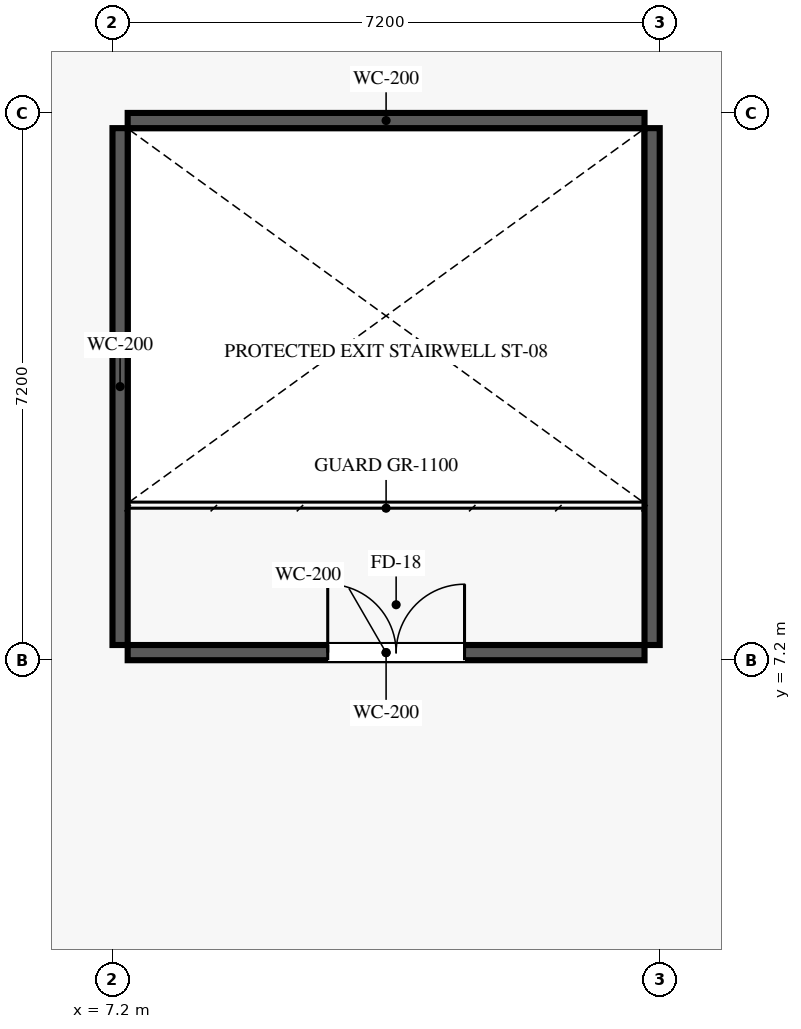
"""IFC4 building model, lengths in metres.
Left out: names, types, materials, properties, quantities, classifications, styles, units other than length and angle.
Written with IfcOpenShell. Run it as: python <this file> out.ifc"""

import sys

from ifc_helpers import new_model, si_unit, direction, frame, frame_2d, origin, place, context, subcontext, project, spatial, rectangle, extrude, element, fill, save


model = new_model("IFC4")
c1 = context("Model", 3, precision=1e-05, world=origin(), true_north=direction((0.0, 1.0)))
c2 = subcontext(c1, "Body", "Model", "MODEL_VIEW")
j1 = project(units=[si_unit("LENGTHUNIT", "METRE"), si_unit("PLANEANGLEUNIT", "RADIAN")], contexts=[c1])
p1 = place(None, origin())
s1 = spatial("IfcSite", under=j1, at=p1, CompositionType="ELEMENT")
p2 = place(p1, origin())
s2 = spatial("IfcBuilding", under=s1, at=p2, CompositionType="ELEMENT")
p3 = place(p2, frame((0.0, 0.0, 5.4)))
s3 = spatial("IfcBuildingStorey", under=s2, at=p3, CompositionType="ELEMENT", Elevation=5.4)
p4 = place(p3, frame((7.4, 7.3, 0.0), z_axis=(0.0, 0.0, 1.0), x_axis=(1.0, 0.0, 0.0)))
e1 = element("IfcWall", 1, at=p4, inside=s3, PredefinedType="SHEAR", context=c2, shape_type="SweptSolid", body=[
    extrude(rectangle(XDim=6.8, YDim=0.2, at=frame_2d((3.4, 0.0))), origin(), (0.0, 0.0, 1.0), 3.81),
])
p5 = place(p4, frame((2.632, 0.0, 0.0)))
e2 = element("IfcOpeningElement", 2, at=p5, cuts=e1, PredefinedType="OPENING", context=c2, shape_type="SweptSolid", body=[
    extrude(rectangle(XDim=1.8, YDim=2.2, at=frame_2d((0.9, 1.1))), frame((0.0, 0.11, 0.0), z_axis=(0.0, -1.0, 0.0), x_axis=(1.0, 0.0, 0.0)), (0.0, 0.0, 1.0), 0.22),
])
for number, where, z_axis, x_axis in (
    (3, (7.4, 14.3, 0.0), (0.0, 0.0, 1.0), (1.0, 0.0, 0.0)),
    (4, (7.3, 7.4, 0.0), (0.0, 0.0, 1.0), (0.0, 1.0, 0.0)),
    (5, (14.3, 7.4, 0.0), (0.0, 0.0, 1.0), (0.0, 1.0, 0.0)),
):
    element("IfcWall", number, at=place(p3, frame(where, z_axis=z_axis, x_axis=x_axis)), inside=s3, PredefinedType="SHEAR", context=c2, shape_type="SweptSolid", body=[
        extrude(rectangle(XDim=6.8, YDim=0.2, at=frame_2d((3.4, 0.0))), origin(), (0.0, 0.0, 1.0), 3.81),
    ])
p6 = place(p5, origin())
e6 = element("IfcDoor", 6, at=p6, inside=s3, OperationType="DOUBLE_DOOR_SINGLE_SWING", PredefinedType="DOOR", context=c2, shape_type="SweptSolid", body=[
    extrude(rectangle(XDim=1.8, YDim=2.2, at=frame_2d((0.9, 1.1))), frame((0.0, 0.025, 0.0), z_axis=(0.0, -1.0, 0.0), x_axis=(1.0, 0.0, 0.0)), (0.0, 0.0, 1.0), 0.05),
])
fill(e2, e6)
save(model, sys.argv[1])
